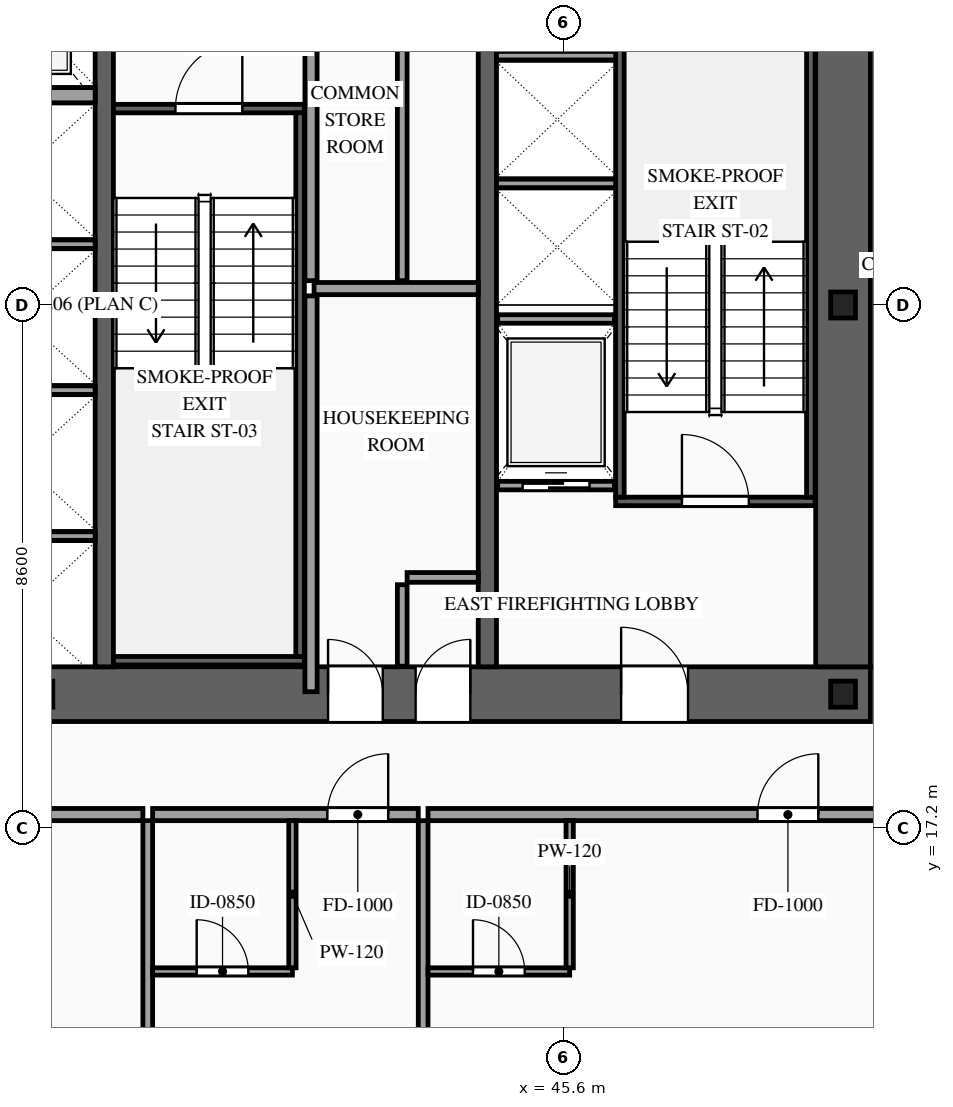
"""IFC4 building model, lengths in metres.
Left out: names, types, materials, properties, quantities, classifications, styles, units other than length and angle.
Written with IfcOpenShell. Run it as: python <this file> out.ifc"""

import sys

from ifc_helpers import new_model, si_unit, direction, frame, frame_2d, origin, origin_2d, place, context, subcontext, project, spatial, rectangle, i_section, extrude, source, transform, mapped, element, fill, save


model = new_model("IFC4")
c1 = context("Model", 3, precision=1e-05, world=origin(), true_north=direction((0.0, 1.0)))
c2 = subcontext(c1, "Body", "Model", "MODEL_VIEW")
j1 = project(units=[si_unit("LENGTHUNIT", "METRE"), si_unit("PLANEANGLEUNIT", "RADIAN")], contexts=[c1])
p1 = place(None, origin())
s1 = spatial("IfcSite", under=j1, at=p1, CompositionType="ELEMENT")
p2 = place(p1, origin())
s2 = spatial("IfcBuilding", under=s1, at=p2, CompositionType="ELEMENT")
p3 = place(p2, frame((0.0, 0.0, 71.2)))
s3 = spatial("IfcBuildingStorey", under=s2, at=p3, CompositionType="ELEMENT", Elevation=71.2)
p4 = place(p3, frame((23.35, 19.4, 0.0), z_axis=(0.0, 0.0, 1.0), x_axis=(1.0, 0.0, 0.0)))
e1 = element("IfcWall", 1, at=p4, inside=s3, PredefinedType="SHEAR", context=c2, shape_type="SweptSolid", body=[
    extrude(rectangle(XDim=27.3, YDim=0.9, at=frame_2d((13.65, 0.0))), origin(), (0.0, 0.0, 1.0), 3.6),
])
p5 = place(p4, frame((2.1, 0.0, 0.0)))
e2 = element("IfcOpeningElement", 2, at=p5, cuts=e1, PredefinedType="OPENING", context=c2, shape_type="SweptSolid", body=[
    extrude(rectangle(XDim=1.1, YDim=2.2, at=frame_2d((0.55, 1.1))), frame((0.0, 0.465, 0.0), z_axis=(0.0, -1.0, 0.0), x_axis=(1.0, 0.0, 0.0)), (0.0, 0.0, 1.0), 0.93),
])
p6 = place(p4, frame((10.0, 0.0, 0.0)))
e3 = element("IfcOpeningElement", 3, at=p6, cuts=e1, PredefinedType="OPENING", context=c2, shape_type="SweptSolid", body=[
    extrude(rectangle(XDim=1.1, YDim=2.2, at=frame_2d((0.55, 1.1))), frame((0.0, 0.465, 0.0), z_axis=(0.0, -1.0, 0.0), x_axis=(1.0, 0.0, 0.0)), (0.0, 0.0, 1.0), 0.93),
])
p7 = place(p4, frame((23.2, 0.0, 0.0)))
e4 = element("IfcOpeningElement", 4, at=p7, cuts=e1, PredefinedType="OPENING", context=c2, shape_type="SweptSolid", body=[
    extrude(rectangle(XDim=1.1, YDim=2.2, at=frame_2d((0.55, 1.1))), frame((0.0, 0.465, 0.0), z_axis=(0.0, -1.0, 0.0), x_axis=(1.0, 0.0, 0.0)), (0.0, 0.0, 1.0), 0.93),
])
p8 = place(p4, frame((19.82, 0.0, 0.0)))
e5 = element("IfcOpeningElement", 5, at=p8, cuts=e1, PredefinedType="OPENING", context=c2, shape_type="SweptSolid", body=[
    extrude(rectangle(XDim=0.9, YDim=2.15, at=frame_2d((0.45, 1.075))), frame((0.0, 0.465, 0.0), z_axis=(0.0, -1.0, 0.0), x_axis=(1.0, 0.0, 0.0)), (0.0, 0.0, 1.0), 0.93),
])
p9 = place(p4, frame((18.38, 0.0, 0.0)))
e6 = element("IfcOpeningElement", 6, at=p9, cuts=e1, PredefinedType="OPENING", context=c2, shape_type="SweptSolid", body=[
    extrude(rectangle(XDim=0.9, YDim=2.15, at=frame_2d((0.45, 1.075))), frame((0.0, 0.465, 0.0), z_axis=(0.0, -1.0, 0.0), x_axis=(1.0, 0.0, 0.0)), (0.0, 0.0, 1.0), 0.93),
])
m1 = source(origin(), c2, "Body", "SweptSolid", [
    extrude(rectangle(XDim=11.9, YDim=0.9, at=frame_2d((5.95, 0.0))), origin(), (0.0, 0.0, 1.0), 3.6),
])
p10 = place(p3, frame((50.2, 19.85, 0.0), z_axis=(0.0, 0.0, 1.0), x_axis=(0.0, 1.0, 0.0)))
e7 = element("IfcWall", 7, at=p10, inside=s3, PredefinedType="SHEAR", context=c2, shape_type="MappedRepresentation", body=[
    mapped(m1, transform((0.0, 0.0, 0.0), scale=1.0)),
])
m2 = source(origin(), c2, "Body", "SweptSolid", [
    extrude(rectangle(XDim=11.9, YDim=0.3, at=frame_2d((5.95, 0.0))), origin(), (0.0, 0.0, 1.0), 3.6),
])
for number, where, z_axis, x_axis in (
    (8, (38.05, 19.85, 0.0), (0.0, 0.0, 1.0), (0.0, 1.0, 0.0)),
    (9, (44.35, 19.85, 0.0), (0.0, 0.0, 1.0), (0.0, 1.0, 0.0)),
):
    element("IfcWall", number, at=place(p3, frame(where, z_axis=z_axis, x_axis=x_axis)), inside=s3, PredefinedType="SOLIDWALL", context=c2, shape_type="MappedRepresentation", body=[
        mapped(m2, transform((0.0, 0.0, 0.0), scale=1.0)),
    ])
m3 = source(origin(), c2, "Body", "SweptSolid", [
    extrude(i_section(OverallWidth=0.407, OverallDepth=0.428, WebThickness=0.02, FlangeThickness=0.035, at=origin_2d()), origin(), (0.0, 0.0, 1.0), 3.6),
])
for number, where, z_axis, x_axis in (
    (10, (37.0, 19.4, 0.0), (0.0, 0.0, 1.0), (1.0, 0.0, 0.0)),
    (11, (50.2, 19.4, 0.0), (0.0, 0.0, 1.0), (1.0, 0.0, 0.0)),
    (12, (50.2, 25.8, 0.0), (0.0, 0.0, 1.0), (1.0, 0.0, 0.0)),
):
    element("IfcColumn", number, at=place(p3, frame(where, z_axis=z_axis, x_axis=x_axis)), inside=s3, PredefinedType="COLUMN", context=c2, shape_type="MappedRepresentation", body=[
        mapped(m3, transform((0.0, 0.0, 0.0), scale=1.0)),
    ])
p11 = place(p3, frame((44.52, 22.83, 0.0), z_axis=(0.0, 0.0, 1.0), x_axis=(1.0, 0.0, 0.0)))
e13 = element("IfcWall", 13, at=p11, inside=s3, PredefinedType="SOLIDWALL", context=c2, shape_type="SweptSolid", body=[
    extrude(rectangle(XDim=1.92, YDim=0.14, at=frame_2d((0.96, 0.0))), origin(), (0.0, 0.0, 1.0), 3.38),
])
p12 = place(p11, frame((0.41, 0.0, 0.0)))
e14 = element("IfcOpeningElement", 14, at=p12, cuts=e13, PredefinedType="OPENING", context=c2, shape_type="SweptSolid", body=[
    extrude(rectangle(XDim=1.1, YDim=2.2, at=frame_2d((0.55, 1.1))), frame((0.0, 0.085, 0.0), z_axis=(0.0, -1.0, 0.0), x_axis=(1.0, 0.0, 0.0)), (0.0, 0.0, 1.0), 0.17),
])
m4 = source(origin(), c2, "Body", "SweptSolid", [
    extrude(rectangle(XDim=1.92, YDim=0.14, at=frame_2d((0.96, 0.0))), origin(), (0.0, 0.0, 1.0), 3.38),
])
p13 = place(p3, frame((44.52, 25.57, 0.0), z_axis=(0.0, 0.0, 1.0), x_axis=(1.0, 0.0, 0.0)))
e15 = element("IfcWall", 15, at=p13, inside=s3, PredefinedType="SOLIDWALL", context=c2, shape_type="MappedRepresentation", body=[
    mapped(m4, transform((0.0, 0.0, 0.0), scale=1.0)),
])
m5 = source(origin(), c2, "Body", "SweptSolid", [
    extrude(rectangle(XDim=2.4, YDim=0.14, at=frame_2d((1.2, 0.0))), origin(), (0.0, 0.0, 1.0), 3.38),
])
for number, where, z_axis, x_axis in (
    (16, (35.5, 22.0, 0.0), (0.0, 0.0, 1.0), (1.0, 0.0, 0.0)),
    (17, (35.5, 24.4, 0.0), (0.0, 0.0, 1.0), (1.0, 0.0, 0.0)),
    (18, (35.5, 26.8, 0.0), (0.0, 0.0, 1.0), (1.0, 0.0, 0.0)),
):
    element("IfcWall", number, at=place(p3, frame(where, z_axis=z_axis, x_axis=x_axis)), inside=s3, PredefinedType="SOLIDWALL", context=c2, shape_type="MappedRepresentation", body=[
        mapped(m5, transform((0.0, 0.0, 0.0), scale=1.0)),
    ])
m6 = source(origin(), c2, "Body", "SweptSolid", [
    extrude(rectangle(XDim=2.4, YDim=0.25, at=frame_2d((1.2, 0.0))), origin(), (0.0, 0.0, 1.0), 3.38),
])
p14 = place(p3, frame((35.5, 29.25, 0.0), z_axis=(0.0, 0.0, 1.0), x_axis=(1.0, 0.0, 0.0)))
e19 = element("IfcWall", 19, at=p14, inside=s3, PredefinedType="SOLIDWALL", context=c2, shape_type="MappedRepresentation", body=[
    mapped(m6, transform((0.0, 0.0, 0.0), scale=1.0)),
])
m7 = source(origin(), c2, "Body", "SweptSolid", [
    extrude(rectangle(XDim=2.0, YDim=0.14, at=frame_2d((1.0, 0.0))), origin(), (0.0, 0.0, 1.0), 3.38),
])
for number, where, z_axis, x_axis in (
    (20, (44.5, 27.8, 0.0), (0.0, 0.0, 1.0), (1.0, 0.0, 0.0)),
    (21, (44.5, 29.9, 0.0), (0.0, 0.0, 1.0), (1.0, 0.0, 0.0)),
):
    element("IfcWall", number, at=place(p3, frame(where, z_axis=z_axis, x_axis=x_axis)), inside=s3, PredefinedType="SOLIDWALL", context=c2, shape_type="MappedRepresentation", body=[
        mapped(m7, transform((0.0, 0.0, 0.0), scale=1.0)),
    ])
p15 = place(p3, frame((46.46, 22.57, 0.0), z_axis=(0.0, 0.0, 1.0), x_axis=(1.0, 0.0, 0.0)))
e22 = element("IfcWall", 22, at=p15, inside=s3, PredefinedType="SOLIDWALL", context=c2, shape_type="SweptSolid", body=[
    extrude(rectangle(XDim=3.28, YDim=0.14, at=frame_2d((1.64, 0.0))), origin(), (0.0, 0.0, 1.0), 3.38),
])
p16 = place(p15, frame((1.09, 0.0, 0.0)))
e23 = element("IfcOpeningElement", 23, at=p16, cuts=e22, PredefinedType="OPENING", context=c2, shape_type="SweptSolid", body=[
    extrude(rectangle(XDim=1.1, YDim=2.2, at=frame_2d((0.55, 1.1))), frame((0.0, 0.085, 0.0), z_axis=(0.0, -1.0, 0.0), x_axis=(1.0, 0.0, 0.0)), (0.0, 0.0, 1.0), 0.17),
])
m8 = source(origin(), c2, "Body", "SweptSolid", [
    extrude(rectangle(XDim=8.94, YDim=0.14, at=frame_2d((4.47, 0.0))), origin(), (0.0, 0.0, 1.0), 3.38),
])
for number, where, z_axis, x_axis in (
    (24, (46.53, 22.64, 0.0), (0.0, 0.0, 1.0), (0.0, 1.0, 0.0)),
    (25, (49.67, 22.64, 0.0), (0.0, 0.0, 1.0), (0.0, 1.0, 0.0)),
):
    element("IfcWall", number, at=place(p3, frame(where, z_axis=z_axis, x_axis=x_axis)), inside=s3, PredefinedType="SOLIDWALL", context=c2, shape_type="MappedRepresentation", body=[
        mapped(m8, transform((0.0, 0.0, 0.0), scale=1.0)),
    ])
p17 = place(p3, frame((38.2, 29.03, 0.0), z_axis=(0.0, 0.0, 1.0), x_axis=(1.0, 0.0, 0.0)))
e26 = element("IfcWall", 26, at=p17, inside=s3, PredefinedType="SOLIDWALL", context=c2, shape_type="SweptSolid", body=[
    extrude(rectangle(XDim=3.14, YDim=0.14, at=frame_2d((1.57, 0.0))), origin(), (0.0, 0.0, 1.0), 3.38),
])
p18 = place(p17, frame((1.02, 0.0, 0.0)))
e27 = element("IfcOpeningElement", 27, at=p18, cuts=e26, PredefinedType="OPENING", context=c2, shape_type="SweptSolid", body=[
    extrude(rectangle(XDim=1.1, YDim=2.2, at=frame_2d((0.55, 1.1))), frame((0.0, 0.085, 0.0), z_axis=(0.0, -1.0, 0.0), x_axis=(1.0, 0.0, 0.0)), (0.0, 0.0, 1.0), 0.17),
])
m9 = source(origin(), c2, "Body", "SweptSolid", [
    extrude(rectangle(XDim=3.14, YDim=0.14, at=frame_2d((1.57, 0.0))), origin(), (0.0, 0.0, 1.0), 3.38),
])
p19 = place(p3, frame((38.2, 19.95, 0.0), z_axis=(0.0, 0.0, 1.0), x_axis=(1.0, 0.0, 0.0)))
e28 = element("IfcWall", 28, at=p19, inside=s3, PredefinedType="SOLIDWALL", context=c2, shape_type="MappedRepresentation", body=[
    mapped(m9, transform((0.0, 0.0, 0.0), scale=1.0)),
])
m10 = source(origin(), c2, "Body", "SweptSolid", [
    extrude(rectangle(XDim=8.94, YDim=0.14, at=frame_2d((4.47, 0.0))), origin(), (0.0, 0.0, 1.0), 3.38),
])
p20 = place(p3, frame((41.27, 20.02, 0.0), z_axis=(0.0, 0.0, 1.0), x_axis=(0.0, 1.0, 0.0)))
e29 = element("IfcWall", 29, at=p20, inside=s3, PredefinedType="SOLIDWALL", context=c2, shape_type="MappedRepresentation", body=[
    mapped(m10, transform((0.0, 0.0, 0.0), scale=1.0)),
])
m11 = source(origin(), c2, "Body", "SweptSolid", [
    extrude(rectangle(XDim=1.34, YDim=0.16, at=frame_2d((0.67, 0.0))), origin(), (0.0, 0.0, 1.0), 3.38),
])
p21 = place(p3, frame((42.95, 19.86, 0.0), z_axis=(0.0, 0.0, 1.0), x_axis=(0.0, 1.0, 0.0)))
e30 = element("IfcWall", 30, at=p21, inside=s3, PredefinedType="PARTITIONING", context=c2, shape_type="MappedRepresentation", body=[
    mapped(m11, transform((0.0, 0.0, 0.0), scale=1.0)),
])
m12 = source(origin(), c2, "Body", "SweptSolid", [
    extrude(rectangle(XDim=1.17, YDim=0.16, at=frame_2d((0.585, 0.0))), origin(), (0.0, 0.0, 1.0), 3.38),
])
p22 = place(p3, frame((43.03, 21.32, 0.0), z_axis=(0.0, 0.0, 1.0), x_axis=(1.0, 0.0, 0.0)))
e31 = element("IfcWall", 31, at=p22, inside=s3, PredefinedType="PARTITIONING", context=c2, shape_type="MappedRepresentation", body=[
    mapped(m12, transform((0.0, 0.0, 0.0), scale=1.0)),
])
m13 = source(origin(), c2, "Body", "SweptSolid", [
    extrude(rectangle(XDim=6.51, YDim=0.2, at=frame_2d((3.255, 0.0))), origin(), (0.0, 0.0, 1.0), 3.38),
])
p23 = place(p3, frame((41.45, 19.44, 0.0), z_axis=(0.0, 0.0, 1.0), x_axis=(0.0, 1.0, 0.0)))
e32 = element("IfcWall", 32, at=p23, inside=s3, PredefinedType="PARTITIONING", context=c2, shape_type="MappedRepresentation", body=[
    mapped(m13, transform((0.0, 0.0, 0.0), scale=1.0)),
])
m14 = source(origin(), c2, "Body", "SweptSolid", [
    extrude(rectangle(XDim=2.7, YDim=0.2, at=frame_2d((1.35, 0.0))), origin(), (0.0, 0.0, 1.0), 3.38),
])
p24 = place(p3, frame((41.5, 26.07, 0.0), z_axis=(0.0, 0.0, 1.0), x_axis=(1.0, 0.0, 0.0)))
e33 = element("IfcWall", 33, at=p24, inside=s3, PredefinedType="PARTITIONING", context=c2, shape_type="MappedRepresentation", body=[
    mapped(m14, transform((0.0, 0.0, 0.0), scale=1.0)),
])
m15 = source(origin(), c2, "Body", "SweptSolid", [
    extrude(rectangle(XDim=5.96, YDim=0.2, at=frame_2d((2.98, 0.0))), origin(), (0.0, 0.0, 1.0), 3.38),
])
p25 = place(p3, frame((41.45, 26.2, 0.0), z_axis=(0.0, 0.0, 1.0), x_axis=(0.0, 1.0, 0.0)))
e34 = element("IfcWall", 34, at=p25, inside=s3, PredefinedType="PARTITIONING", context=c2, shape_type="MappedRepresentation", body=[
    mapped(m15, transform((0.0, 0.0, 0.0), scale=1.0)),
])
m16 = source(origin(), c2, "Body", "SweptSolid", [
    extrude(rectangle(XDim=5.96, YDim=0.16, at=frame_2d((2.98, 0.0))), origin(), (0.0, 0.0, 1.0), 3.38),
])
p26 = place(p3, frame((42.95, 26.2, 0.0), z_axis=(0.0, 0.0, 1.0), x_axis=(0.0, 1.0, 0.0)))
e35 = element("IfcWall", 35, at=p26, inside=s3, PredefinedType="PARTITIONING", context=c2, shape_type="MappedRepresentation", body=[
    mapped(m16, transform((0.0, 0.0, 0.0), scale=1.0)),
])
p27 = place(p3, frame((28.668, 17.42, 0.0), z_axis=(0.0, 0.0, 1.0), x_axis=(1.0, 0.0, 0.0)))
e36 = element("IfcWall", 36, at=p27, inside=s3, PredefinedType="PARTITIONING", context=c2, shape_type="SweptSolid", body=[
    extrude(rectangle(XDim=10.017, YDim=0.2, at=frame_2d((5.009, 0.0))), origin(), (0.0, 0.0, 1.0), 3.38),
])
p28 = place(p27, frame((5.714, 0.0, 0.0)))
e37 = element("IfcOpeningElement", 37, at=p28, cuts=e36, PredefinedType="OPENING", context=c2, shape_type="SweptSolid", body=[
    extrude(rectangle(XDim=1.0, YDim=2.2, at=frame_2d((0.5, 1.1))), frame((0.0, 0.115, 0.0), z_axis=(0.0, -1.0, 0.0), x_axis=(1.0, 0.0, 0.0)), (0.0, 0.0, 1.0), 0.23),
])
m17 = source(origin(), c2, "Body", "SweptSolid", [
    extrude(rectangle(XDim=16.47, YDim=0.16, at=frame_2d((8.235, 0.0))), origin(), (0.0, 0.0, 1.0), 3.38),
])
p29 = place(p3, frame((38.765, 0.85, 0.0), z_axis=(0.0, 0.0, 1.0), x_axis=(0.0, 1.0, 0.0)))
e38 = element("IfcWall", 38, at=p29, inside=s3, PredefinedType="PARTITIONING", context=c2, shape_type="MappedRepresentation", body=[
    mapped(m17, transform((0.0, 0.0, 0.0), scale=1.0)),
])
p30 = place(p3, frame((38.845, 17.42, 0.0), z_axis=(0.0, 0.0, 1.0), x_axis=(1.0, 0.0, 0.0)))
e39 = element("IfcWall", 39, at=p30, inside=s3, PredefinedType="PARTITIONING", context=c2, shape_type="SweptSolid", body=[
    extrude(rectangle(XDim=4.369, YDim=0.2, at=frame_2d((2.185, 0.0))), origin(), (0.0, 0.0, 1.0), 3.38),
])
p31 = place(p30, frame((2.874, 0.0, 0.0)))
e40 = element("IfcOpeningElement", 40, at=p31, cuts=e39, PredefinedType="OPENING", context=c2, shape_type="SweptSolid", body=[
    extrude(rectangle(XDim=1.0, YDim=2.2, at=frame_2d((0.5, 1.1))), frame((0.0, 0.115, 0.0), z_axis=(0.0, -1.0, 0.0), x_axis=(1.0, 0.0, 0.0)), (0.0, 0.0, 1.0), 0.23),
])
p32 = place(p3, frame((43.294, 0.85, 0.0), z_axis=(0.0, 0.0, 1.0), x_axis=(0.0, 1.0, 0.0)))
e41 = element("IfcWall", 41, at=p32, inside=s3, PredefinedType="PARTITIONING", context=c2, shape_type="MappedRepresentation", body=[
    mapped(m17, transform((0.0, 0.0, 0.0), scale=1.0)),
])
p33 = place(p3, frame((38.845, 14.84, 0.0), z_axis=(0.0, 0.0, 1.0), x_axis=(1.0, 0.0, 0.0)))
e42 = element("IfcWall", 42, at=p33, inside=s3, PredefinedType="PARTITIONING", context=c2, shape_type="SweptSolid", body=[
    extrude(rectangle(XDim=2.299, YDim=0.12, at=frame_2d((1.149, 0.0))), origin(), (0.0, 0.0, 1.0), 3.38),
])
p34 = place(p33, frame((0.725, 0.0, 0.0)))
e43 = element("IfcOpeningElement", 43, at=p34, cuts=e42, PredefinedType="OPENING", context=c2, shape_type="SweptSolid", body=[
    extrude(rectangle(XDim=0.85, YDim=2.1, at=frame_2d((0.425, 1.05))), frame((0.0, 0.075, 0.0), z_axis=(0.0, -1.0, 0.0), x_axis=(1.0, 0.0, 0.0)), (0.0, 0.0, 1.0), 0.15),
])
m18 = source(origin(), c2, "Body", "SweptSolid", [
    extrude(rectangle(XDim=2.42, YDim=0.12, at=frame_2d((1.21, 0.0))), origin(), (0.0, 0.0, 1.0), 3.38),
])
p35 = place(p3, frame((41.144, 14.9, 0.0), z_axis=(0.0, 0.0, 1.0), x_axis=(0.0, 1.0, 0.0)))
e44 = element("IfcWall", 44, at=p35, inside=s3, PredefinedType="PARTITIONING", context=c2, shape_type="MappedRepresentation", body=[
    mapped(m18, transform((0.0, 0.0, 0.0), scale=1.0)),
])
p36 = place(p3, frame((43.374, 17.42, 0.0), z_axis=(0.0, 0.0, 1.0), x_axis=(1.0, 0.0, 0.0)))
e45 = element("IfcWall", 45, at=p36, inside=s3, PredefinedType="PARTITIONING", context=c2, shape_type="SweptSolid", body=[
    extrude(rectangle(XDim=9.429, YDim=0.2, at=frame_2d((4.714, 0.0))), origin(), (0.0, 0.0, 1.0), 3.38),
])
p37 = place(p36, frame((5.419, 0.0, 0.0)))
e46 = element("IfcOpeningElement", 46, at=p37, cuts=e45, PredefinedType="OPENING", context=c2, shape_type="SweptSolid", body=[
    extrude(rectangle(XDim=1.0, YDim=2.2, at=frame_2d((0.5, 1.1))), frame((0.0, 0.115, 0.0), z_axis=(0.0, -1.0, 0.0), x_axis=(1.0, 0.0, 0.0)), (0.0, 0.0, 1.0), 0.23),
])
p38 = place(p3, frame((43.374, 14.84, 0.0), z_axis=(0.0, 0.0, 1.0), x_axis=(1.0, 0.0, 0.0)))
e47 = element("IfcWall", 47, at=p38, inside=s3, PredefinedType="PARTITIONING", context=c2, shape_type="SweptSolid", body=[
    extrude(rectangle(XDim=2.33, YDim=0.12, at=frame_2d((1.165, 0.0))), origin(), (0.0, 0.0, 1.0), 3.38),
])
p39 = place(p38, frame((0.74, 0.0, 0.0)))
e48 = element("IfcOpeningElement", 48, at=p39, cuts=e47, PredefinedType="OPENING", context=c2, shape_type="SweptSolid", body=[
    extrude(rectangle(XDim=0.85, YDim=2.1, at=frame_2d((0.425, 1.05))), frame((0.0, 0.075, 0.0), z_axis=(0.0, -1.0, 0.0), x_axis=(1.0, 0.0, 0.0)), (0.0, 0.0, 1.0), 0.15),
])
p40 = place(p3, frame((45.704, 14.9, 0.0), z_axis=(0.0, 0.0, 1.0), x_axis=(0.0, 1.0, 0.0)))
e49 = element("IfcWall", 49, at=p40, inside=s3, PredefinedType="PARTITIONING", context=c2, shape_type="MappedRepresentation", body=[
    mapped(m18, transform((0.0, 0.0, 0.0), scale=1.0)),
])
m19 = source(origin(), c2, "Body", "SweptSolid", [
    extrude(rectangle(XDim=1.1, YDim=2.2, at=frame_2d((0.55, 1.1))), frame((0.0, 0.025, 0.0), z_axis=(0.0, -1.0, 0.0), x_axis=(1.0, 0.0, 0.0)), (0.0, 0.0, 1.0), 0.05),
])
p41 = place(p12, origin())
e50 = element("IfcDoor", 50, at=p41, inside=s3, OperationType="SLIDING_TO_RIGHT", PredefinedType="DOOR", context=c2, shape_type="MappedRepresentation", body=[
    mapped(m19, transform((0.0, 0.0, 0.0), scale=1.0)),
])
fill(e14, e50)
m20 = source(origin(), c2, "Body", "SweptSolid", [
    extrude(rectangle(XDim=1.1, YDim=2.2, at=frame_2d((0.55, 1.1))), frame((0.0, 0.025, 0.0), z_axis=(0.0, -1.0, 0.0), x_axis=(1.0, 0.0, 0.0)), (0.0, 0.0, 1.0), 0.05),
])
p42 = place(p16, origin())
e51 = element("IfcDoor", 51, at=p42, inside=s3, OperationType="SINGLE_SWING_LEFT", PredefinedType="DOOR", context=c2, shape_type="MappedRepresentation", body=[
    mapped(m20, transform((0.0, 0.0, 0.0), scale=1.0)),
])
fill(e23, e51)
p43 = place(p18, origin())
e52 = element("IfcDoor", 52, at=p43, inside=s3, OperationType="SINGLE_SWING_RIGHT", PredefinedType="DOOR", context=c2, shape_type="MappedRepresentation", body=[
    mapped(m20, transform((0.0, 0.0, 0.0), scale=1.0)),
])
fill(e27, e52)
p44 = place(p7, origin())
e53 = element("IfcDoor", 53, at=p44, inside=s3, OperationType="SINGLE_SWING_LEFT", PredefinedType="DOOR", context=c2, shape_type="MappedRepresentation", body=[
    mapped(m20, transform((0.0, 0.0, 0.0), scale=1.0)),
])
fill(e4, e53)
m21 = source(origin(), c2, "Body", "SweptSolid", [
    extrude(rectangle(XDim=0.9, YDim=2.15, at=frame_2d((0.45, 1.075))), frame((0.0, 0.025, 0.0), z_axis=(0.0, -1.0, 0.0), x_axis=(1.0, 0.0, 0.0)), (0.0, 0.0, 1.0), 0.05),
])
p45 = place(p8, origin())
e54 = element("IfcDoor", 54, at=p45, inside=s3, OperationType="SINGLE_SWING_RIGHT", PredefinedType="DOOR", context=c2, shape_type="MappedRepresentation", body=[
    mapped(m21, transform((0.0, 0.0, 0.0), scale=1.0)),
])
fill(e5, e54)
p46 = place(p9, origin())
e55 = element("IfcDoor", 55, at=p46, inside=s3, OperationType="SINGLE_SWING_LEFT", PredefinedType="DOOR", context=c2, shape_type="MappedRepresentation", body=[
    mapped(m21, transform((0.0, 0.0, 0.0), scale=1.0)),
])
fill(e6, e55)
m22 = source(origin(), c2, "Body", "SweptSolid", [
    extrude(rectangle(XDim=1.0, YDim=2.2, at=frame_2d((0.5, 1.1))), frame((0.0, 0.025, 0.0), z_axis=(0.0, -1.0, 0.0), x_axis=(1.0, 0.0, 0.0)), (0.0, 0.0, 1.0), 0.05),
])
p47 = place(p31, origin())
e56 = element("IfcDoor", 56, at=p47, inside=s3, OperationType="SINGLE_SWING_RIGHT", PredefinedType="DOOR", context=c2, shape_type="MappedRepresentation", body=[
    mapped(m22, transform((0.0, 0.0, 0.0), scale=1.0)),
])
fill(e40, e56)
m23 = source(origin(), c2, "Body", "SweptSolid", [
    extrude(rectangle(XDim=0.85, YDim=2.1, at=frame_2d((0.425, 1.05))), frame((0.0, 0.025, 0.0), z_axis=(0.0, -1.0, 0.0), x_axis=(1.0, 0.0, 0.0)), (0.0, 0.0, 1.0), 0.05),
])
p48 = place(p34, origin())
e57 = element("IfcDoor", 57, at=p48, inside=s3, OperationType="SINGLE_SWING_LEFT", PredefinedType="DOOR", context=c2, shape_type="MappedRepresentation", body=[
    mapped(m23, transform((0.0, 0.0, 0.0), scale=1.0)),
])
fill(e43, e57)
p49 = place(p37, origin())
e58 = element("IfcDoor", 58, at=p49, inside=s3, OperationType="SINGLE_SWING_RIGHT", PredefinedType="DOOR", context=c2, shape_type="MappedRepresentation", body=[
    mapped(m22, transform((0.0, 0.0, 0.0), scale=1.0)),
])
fill(e46, e58)
p50 = place(p39, origin())
e59 = element("IfcDoor", 59, at=p50, inside=s3, OperationType="SINGLE_SWING_LEFT", PredefinedType="DOOR", context=c2, shape_type="MappedRepresentation", body=[
    mapped(m23, transform((0.0, 0.0, 0.0), scale=1.0)),
])
fill(e48, e59)
save(model, sys.argv[1])
